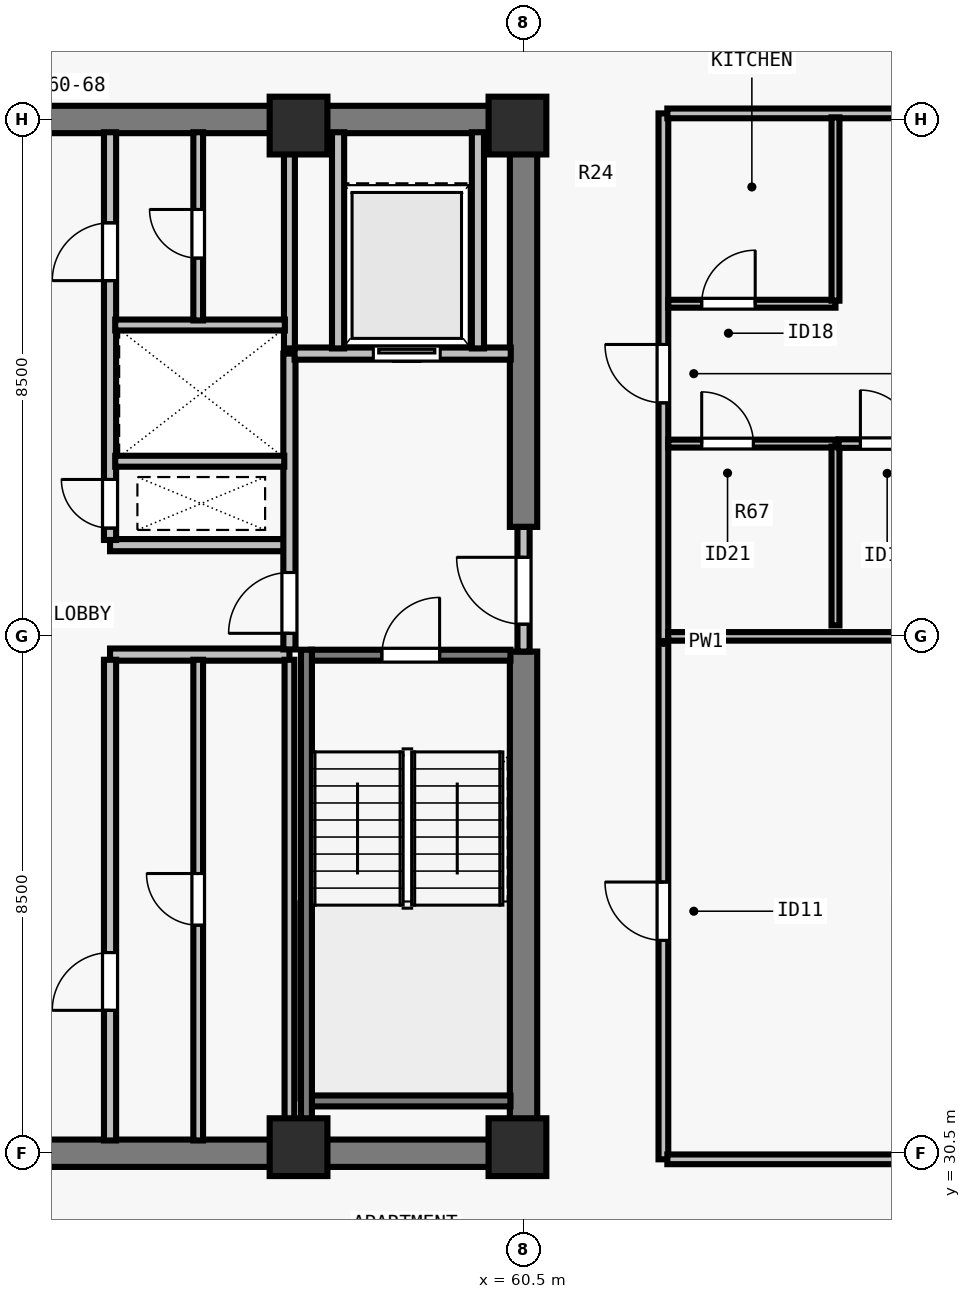
"""IFC4 building model, lengths in metres.
Left out: names, types, materials, properties, quantities, classifications, styles, units other than length and angle.
Written with IfcOpenShell. Run it as: python <this file> out.ifc"""

import sys

from ifc_helpers import new_model, si_unit, direction, frame, frame_2d, origin, origin_2d, place, context, subcontext, project, spatial, rectangle, extrude, element, fill, save


model = new_model("IFC4")
c1 = context("Model", 3, precision=1e-05, world=origin(), true_north=direction((0.0, 1.0)))
c2 = subcontext(c1, "Body", "Model", "MODEL_VIEW")
j1 = project(units=[si_unit("LENGTHUNIT", "METRE"), si_unit("PLANEANGLEUNIT", "RADIAN")], contexts=[c1])
p1 = place(None, origin())
s1 = spatial("IfcSite", under=j1, at=p1, CompositionType="ELEMENT")
p2 = place(p1, origin())
s2 = spatial("IfcBuilding", under=s1, at=p2, CompositionType="ELEMENT")
p3 = place(p2, frame((0.0, 0.0, 237.5)))
s3 = spatial("IfcBuildingStorey", under=s2, at=p3, CompositionType="ELEMENT", Elevation=237.5)
for number, where, z_axis, x_axis in (
    (1, (56.8, 30.6, 0.0), (0.0, 0.0, 1.0), (1.0, 0.0, 0.0)),
    (2, (60.4, 30.6, 0.0), (0.0, 0.0, 1.0), (1.0, 0.0, 0.0)),
    (3, (56.8, 47.4, 0.0), (0.0, 0.0, 1.0), (1.0, 0.0, 0.0)),
    (4, (60.4, 47.4, 0.0), (0.0, 0.0, 1.0), (1.0, 0.0, 0.0)),
):
    element("IfcColumn", number, at=place(p3, frame(where, z_axis=z_axis, x_axis=x_axis)), inside=s3, PredefinedType="COLUMN", context=c2, shape_type="SweptSolid", body=[
        extrude(rectangle(XDim=0.95, YDim=0.95, at=origin_2d()), origin(), (0.0, 0.0, 1.0), 3.5),
    ])
for number, where, z_axis, x_axis in (
    (5, (43.275, 30.5, 0.0), (0.0, 0.0, 1.0), (1.0, 0.0, 0.0)),
    (6, (43.275, 47.5, 0.0), (0.0, 0.0, 1.0), (1.0, 0.0, 0.0)),
):
    element("IfcWall", number, at=place(p3, frame(where, z_axis=z_axis, x_axis=x_axis)), inside=s3, PredefinedType="SHEAR", context=c2, shape_type="SweptSolid", body=[
        extrude(rectangle(XDim=17.45, YDim=0.45, at=frame_2d((8.725, 0.0))), origin(), (0.0, 0.0, 1.0), 3.29),
    ])
p4 = place(p3, frame((60.5, 30.715, 0.0), z_axis=(0.0, 0.0, 1.0), x_axis=(0.0, 1.0, 0.0)))
e7 = element("IfcWall", 7, at=p4, inside=s3, PredefinedType="SHEAR", context=c2, shape_type="SweptSolid", body=[
    extrude(rectangle(XDim=8.035, YDim=0.45, at=frame_2d((4.018, 0.0))), origin(), (0.0, 0.0, 1.0), 3.29),
])
p5 = place(p3, frame((60.5, 40.8, 0.0), z_axis=(0.0, 0.0, 1.0), x_axis=(0.0, 1.0, 0.0)))
e8 = element("IfcWall", 8, at=p5, inside=s3, PredefinedType="SHEAR", context=c2, shape_type="SweptSolid", body=[
    extrude(rectangle(XDim=6.485, YDim=0.45, at=frame_2d((3.242, 0.0))), origin(), (0.0, 0.0, 1.0), 3.29),
])
for number, where, z_axis, x_axis in (
    (9, (53.7, 38.7, 0.0), (0.0, 0.0, 1.0), (1.0, 0.0, 0.0)),
    (10, (53.7, 40.5, 0.0), (0.0, 0.0, 1.0), (1.0, 0.0, 0.0)),
):
    element("IfcWall", number, at=place(p3, frame(where, z_axis=z_axis, x_axis=x_axis)), inside=s3, PredefinedType="SOLIDWALL", context=c2, shape_type="SweptSolid", body=[
        extrude(rectangle(XDim=2.95, YDim=0.2, at=frame_2d((1.475, 0.0))), origin(), (0.0, 0.0, 1.0), 3.29),
    ])
p6 = place(p3, frame((53.7, 30.71, 0.0), z_axis=(0.0, 0.0, 1.0), x_axis=(0.0, 1.0, 0.0)))
e11 = element("IfcWall", 11, at=p6, inside=s3, PredefinedType="SOLIDWALL", context=c2, shape_type="SweptSolid", body=[
    extrude(rectangle(XDim=7.905, YDim=0.2, at=frame_2d((3.953, 0.0))), origin(), (0.0, 0.0, 1.0), 3.29),
])
p7 = place(p6, frame((2.14, 0.0, 0.0)))
e12 = element("IfcOpeningElement", 12, at=p7, cuts=e11, PredefinedType="OPENING", context=c2, shape_type="SweptSolid", body=[
    extrude(rectangle(XDim=0.95, YDim=2.12, at=frame_2d((0.475, 1.06))), frame((0.0, 0.11, 0.0), z_axis=(0.0, -1.0, 0.0), x_axis=(1.0, 0.0, 0.0)), (0.0, 0.0, 1.0), 0.22),
])
p8 = place(p3, frame((53.7, 40.585, 0.0), z_axis=(0.0, 0.0, 1.0), x_axis=(0.0, 1.0, 0.0)))
e13 = element("IfcWall", 13, at=p8, inside=s3, PredefinedType="SOLIDWALL", context=c2, shape_type="SweptSolid", body=[
    extrude(rectangle(XDim=6.705, YDim=0.2, at=frame_2d((3.353, 0.0))), origin(), (0.0, 0.0, 1.0), 3.29),
])
p9 = place(p8, frame((0.195, 0.0, 0.0)))
e14 = element("IfcOpeningElement", 14, at=p9, cuts=e13, PredefinedType="OPENING", context=c2, shape_type="SweptSolid", body=[
    extrude(rectangle(XDim=0.8, YDim=2.08, at=frame_2d((0.4, 1.04))), frame((0.0, 0.11, 0.0), z_axis=(0.0, -1.0, 0.0), x_axis=(1.0, 0.0, 0.0)), (0.0, 0.0, 1.0), 0.22),
])
p10 = place(p8, frame((4.265, 0.0, 0.0)))
e15 = element("IfcOpeningElement", 15, at=p10, cuts=e13, PredefinedType="OPENING", context=c2, shape_type="SweptSolid", body=[
    extrude(rectangle(XDim=0.95, YDim=2.12, at=frame_2d((0.475, 1.06))), frame((0.0, 0.11, 0.0), z_axis=(0.0, -1.0, 0.0), x_axis=(1.0, 0.0, 0.0)), (0.0, 0.0, 1.0), 0.22),
])
p11 = place(p3, frame((60.5, 38.75, 0.0), z_axis=(0.0, 0.0, 1.0), x_axis=(0.0, 1.0, 0.0)))
e16 = element("IfcWall", 16, at=p11, inside=s3, PredefinedType="SOLIDWALL", context=c2, shape_type="SweptSolid", body=[
    extrude(rectangle(XDim=2.05, YDim=0.2, at=frame_2d((1.025, 0.0))), origin(), (0.0, 0.0, 1.0), 3.29),
])
p12 = place(p11, frame((0.45, 0.0, 0.0)))
e17 = element("IfcOpeningElement", 17, at=p12, cuts=e16, PredefinedType="OPENING", context=c2, shape_type="SweptSolid", body=[
    extrude(rectangle(XDim=1.1, YDim=2.15, at=frame_2d((0.55, 1.075))), frame((0.0, 0.11, 0.0), z_axis=(0.0, -1.0, 0.0), x_axis=(1.0, 0.0, 0.0)), (0.0, 0.0, 1.0), 0.22),
])
p13 = place(p3, frame((56.65, 38.785, 0.0), z_axis=(0.0, 0.0, 1.0), x_axis=(0.0, 1.0, 0.0)))
e18 = element("IfcWall", 18, at=p13, inside=s3, PredefinedType="SOLIDWALL", context=c2, shape_type="SweptSolid", body=[
    extrude(rectangle(XDim=4.865, YDim=0.2, at=frame_2d((2.433, 0.0))), origin(), (0.0, 0.0, 1.0), 3.29),
])
p14 = place(p13, frame((0.265, 0.0, 0.0)))
e19 = element("IfcOpeningElement", 19, at=p14, cuts=e18, PredefinedType="OPENING", context=c2, shape_type="SweptSolid", body=[
    extrude(rectangle(XDim=1.0, YDim=2.15, at=frame_2d((0.5, 1.075))), frame((0.0, 0.11, 0.0), z_axis=(0.0, -1.0, 0.0), x_axis=(1.0, 0.0, 0.0)), (0.0, 0.0, 1.0), 0.22),
])
p15 = place(p3, frame((56.735, 43.65, 0.0), z_axis=(0.0, 0.0, 1.0), x_axis=(1.0, 0.0, 0.0)))
e20 = element("IfcWall", 20, at=p15, inside=s3, PredefinedType="SOLIDWALL", context=c2, shape_type="SweptSolid", body=[
    extrude(rectangle(XDim=3.555, YDim=0.2, at=frame_2d((1.777, 0.0))), origin(), (0.0, 0.0, 1.0), 3.29),
])
p16 = place(p15, frame((1.295, 0.0, 0.0)))
e21 = element("IfcOpeningElement", 21, at=p16, cuts=e20, PredefinedType="OPENING", context=c2, shape_type="SweptSolid", body=[
    extrude(rectangle(XDim=1.1, YDim=2.2, at=frame_2d((0.55, 1.1))), frame((0.0, 0.11, 0.0), z_axis=(0.0, -1.0, 0.0), x_axis=(1.0, 0.0, 0.0)), (0.0, 0.0, 1.0), 0.22),
])
for number, where, z_axis, x_axis in (
    (22, (57.45, 43.735, 0.0), (0.0, 0.0, 1.0), (0.0, 1.0, 0.0)),
    (23, (59.75, 43.735, 0.0), (0.0, 0.0, 1.0), (0.0, 1.0, 0.0)),
):
    element("IfcWall", number, at=place(p3, frame(where, z_axis=z_axis, x_axis=x_axis)), inside=s3, PredefinedType="SOLIDWALL", context=c2, shape_type="SweptSolid", body=[
        extrude(rectangle(XDim=3.555, YDim=0.2, at=frame_2d((1.777, 0.0))), origin(), (0.0, 0.0, 1.0), 3.29),
    ])
p17 = place(p3, frame((56.65, 30.71, 0.0), z_axis=(0.0, 0.0, 1.0), x_axis=(0.0, 1.0, 0.0)))
e24 = element("IfcWall", 24, at=p17, inside=s3, PredefinedType="PARTITIONING", context=c2, shape_type="SweptSolid", body=[
    extrude(rectangle(XDim=7.905, YDim=0.16, at=frame_2d((3.953, 0.0))), origin(), (0.0, 0.0, 1.0), 3.29),
])
p18 = place(p3, frame((55.15, 30.71, 0.0), z_axis=(0.0, 0.0, 1.0), x_axis=(0.0, 1.0, 0.0)))
e25 = element("IfcWall", 25, at=p18, inside=s3, PredefinedType="PARTITIONING", context=c2, shape_type="SweptSolid", body=[
    extrude(rectangle(XDim=7.905, YDim=0.16, at=frame_2d((3.953, 0.0))), origin(), (0.0, 0.0, 1.0), 3.29),
])
p19 = place(p18, frame((3.54, 0.0, 0.0)))
e26 = element("IfcOpeningElement", 26, at=p19, cuts=e25, PredefinedType="OPENING", context=c2, shape_type="SweptSolid", body=[
    extrude(rectangle(XDim=0.85, YDim=2.12, at=frame_2d((0.425, 1.06))), frame((0.0, 0.09, 0.0), z_axis=(0.0, -1.0, 0.0), x_axis=(1.0, 0.0, 0.0)), (0.0, 0.0, 1.0), 0.18),
])
p20 = place(p3, frame((56.65, 43.735, 0.0), z_axis=(0.0, 0.0, 1.0), x_axis=(0.0, 1.0, 0.0)))
e27 = element("IfcWall", 27, at=p20, inside=s3, PredefinedType="SOLIDWALL", context=c2, shape_type="SweptSolid", body=[
    extrude(rectangle(XDim=3.555, YDim=0.18, at=frame_2d((1.777, 0.0))), origin(), (0.0, 0.0, 1.0), 3.29),
])
p21 = place(p3, frame((53.785, 41.88, 0.0), z_axis=(0.0, 0.0, 1.0), x_axis=(1.0, 0.0, 0.0)))
e28 = element("IfcWall", 28, at=p21, inside=s3, PredefinedType="SOLIDWALL", context=c2, shape_type="SweptSolid", body=[
    extrude(rectangle(XDim=2.78, YDim=0.18, at=frame_2d((1.39, 0.0))), origin(), (0.0, 0.0, 1.0), 3.29),
])
p22 = place(p3, frame((53.785, 44.12, 0.0), z_axis=(0.0, 0.0, 1.0), x_axis=(1.0, 0.0, 0.0)))
e29 = element("IfcWall", 29, at=p22, inside=s3, PredefinedType="SOLIDWALL", context=c2, shape_type="SweptSolid", body=[
    extrude(rectangle(XDim=2.79, YDim=0.18, at=frame_2d((1.395, 0.0))), origin(), (0.0, 0.0, 1.0), 3.29),
])
p23 = place(p3, frame((55.15, 44.195, 0.0), z_axis=(0.0, 0.0, 1.0), x_axis=(0.0, 1.0, 0.0)))
e30 = element("IfcWall", 30, at=p23, inside=s3, PredefinedType="PARTITIONING", context=c2, shape_type="SweptSolid", body=[
    extrude(rectangle(XDim=3.095, YDim=0.16, at=frame_2d((1.547, 0.0))), origin(), (0.0, 0.0, 1.0), 3.29),
])
p24 = place(p23, frame((1.025, 0.0, 0.0)))
e31 = element("IfcOpeningElement", 31, at=p24, cuts=e30, PredefinedType="OPENING", context=c2, shape_type="SweptSolid", body=[
    extrude(rectangle(XDim=0.8, YDim=2.1, at=frame_2d((0.4, 1.05))), frame((0.0, 0.09, 0.0), z_axis=(0.0, -1.0, 0.0), x_axis=(1.0, 0.0, 0.0)), (0.0, 0.0, 1.0), 0.18),
])
p25 = place(p3, frame((62.8, 30.4, 0.0), z_axis=(0.0, 0.0, 1.0), x_axis=(0.0, 1.0, 0.0)))
e32 = element("IfcWall", 32, at=p25, inside=s3, PredefinedType="PARTITIONING", context=c2, shape_type="SweptSolid", body=[
    extrude(rectangle(XDim=17.2, YDim=0.16, at=frame_2d((8.6, 0.0))), origin(), (0.0, 0.0, 1.0), 3.29),
])
p26 = place(p25, frame((3.6, 0.0, 0.0)))
e33 = element("IfcOpeningElement", 33, at=p26, cuts=e32, PredefinedType="OPENING", context=c2, shape_type="SweptSolid", body=[
    extrude(rectangle(XDim=0.96, YDim=2.12, at=frame_2d((0.48, 1.06))), frame((0.0, 0.09, 0.0), z_axis=(0.0, -1.0, 0.0), x_axis=(1.0, 0.0, 0.0)), (0.0, 0.0, 1.0), 0.18),
])
p27 = place(p25, frame((12.44, 0.0, 0.0)))
e34 = element("IfcOpeningElement", 34, at=p27, cuts=e32, PredefinedType="OPENING", context=c2, shape_type="SweptSolid", body=[
    extrude(rectangle(XDim=0.96, YDim=2.18, at=frame_2d((0.48, 1.09))), frame((0.0, 0.09, 0.0), z_axis=(0.0, -1.0, 0.0), x_axis=(1.0, 0.0, 0.0)), (0.0, 0.0, 1.0), 0.18),
])
for number, where, z_axis, x_axis in (
    (35, (62.865, 30.4, 0.0), (0.0, 0.0, 1.0), (1.0, 0.0, 0.0)),
    (36, (62.865, 47.6, 0.0), (0.0, 0.0, 1.0), (1.0, 0.0, 0.0)),
):
    element("IfcWall", number, at=place(p3, frame(where, z_axis=z_axis, x_axis=x_axis)), inside=s3, PredefinedType="PARTITIONING", context=c2, shape_type="SweptSolid", body=[
        extrude(rectangle(XDim=11.33, YDim=0.16, at=frame_2d((5.665, 0.0))), origin(), (0.0, 0.0, 1.0), 3.29),
    ])
p28 = place(p3, frame((62.88, 39.0, 0.0), z_axis=(0.0, 0.0, 1.0), x_axis=(1.0, 0.0, 0.0)))
e37 = element("IfcWall", 37, at=p28, inside=s3, PredefinedType="PARTITIONING", context=c2, shape_type="SweptSolid", body=[
    extrude(rectangle(XDim=11.315, YDim=0.14, at=frame_2d((5.658, 0.0))), origin(), (0.0, 0.0, 1.0), 3.29),
])
p29 = place(p3, frame((62.88, 42.17, 0.0), z_axis=(0.0, 0.0, 1.0), x_axis=(1.0, 0.0, 0.0)))
e38 = element("IfcWall", 38, at=p29, inside=s3, PredefinedType="PLUMBINGWALL", context=c2, shape_type="SweptSolid", body=[
    extrude(rectangle(XDim=2.75, YDim=0.13, at=frame_2d((1.375, 0.0))), origin(), (0.0, 0.0, 1.0), 3.29),
])
p30 = place(p29, frame((0.55, 0.0, 0.0)))
e39 = element("IfcOpeningElement", 39, at=p30, cuts=e38, PredefinedType="OPENING", context=c2, shape_type="SweptSolid", body=[
    extrude(rectangle(XDim=0.85, YDim=2.08, at=frame_2d((0.425, 1.04))), frame((0.0, 0.075, 0.0), z_axis=(0.0, -1.0, 0.0), x_axis=(1.0, 0.0, 0.0)), (0.0, 0.0, 1.0), 0.15),
])
p31 = place(p3, frame((65.63, 39.18, 0.0), z_axis=(0.0, 0.0, 1.0), x_axis=(0.0, 1.0, 0.0)))
e40 = element("IfcWall", 40, at=p31, inside=s3, PredefinedType="PLUMBINGWALL", context=c2, shape_type="SweptSolid", body=[
    extrude(rectangle(XDim=2.94, YDim=0.13, at=frame_2d((1.47, 0.0))), origin(), (0.0, 0.0, 1.0), 3.29),
])
p32 = place(p3, frame((62.88, 44.47, 0.0), z_axis=(0.0, 0.0, 1.0), x_axis=(1.0, 0.0, 0.0)))
e41 = element("IfcWall", 41, at=p32, inside=s3, PredefinedType="PLUMBINGWALL", context=c2, shape_type="SweptSolid", body=[
    extrude(rectangle(XDim=2.75, YDim=0.13, at=frame_2d((1.375, 0.0))), origin(), (0.0, 0.0, 1.0), 3.29),
])
p33 = place(p32, frame((0.55, 0.0, 0.0)))
e42 = element("IfcOpeningElement", 42, at=p33, cuts=e41, PredefinedType="OPENING", context=c2, shape_type="SweptSolid", body=[
    extrude(rectangle(XDim=0.88, YDim=2.1, at=frame_2d((0.44, 1.05))), frame((0.0, 0.075, 0.0), z_axis=(0.0, -1.0, 0.0), x_axis=(1.0, 0.0, 0.0)), (0.0, 0.0, 1.0), 0.15),
])
p34 = place(p3, frame((65.63, 44.52, 0.0), z_axis=(0.0, 0.0, 1.0), x_axis=(0.0, 1.0, 0.0)))
e43 = element("IfcWall", 43, at=p34, inside=s3, PredefinedType="PLUMBINGWALL", context=c2, shape_type="SweptSolid", body=[
    extrude(rectangle(XDim=3.015, YDim=0.13, at=frame_2d((1.507, 0.0))), origin(), (0.0, 0.0, 1.0), 3.29),
])
p35 = place(p3, frame((65.68, 42.17, 0.0), z_axis=(0.0, 0.0, 1.0), x_axis=(1.0, 0.0, 0.0)))
e44 = element("IfcWall", 44, at=p35, inside=s3, PredefinedType="PARTITIONING", context=c2, shape_type="SweptSolid", body=[
    extrude(rectangle(XDim=8.44, YDim=0.14, at=frame_2d((4.22, 0.0))), origin(), (0.0, 0.0, 1.0), 3.29),
])
p36 = place(p35, frame((0.36, 0.0, 0.0)))
e45 = element("IfcOpeningElement", 45, at=p36, cuts=e44, PredefinedType="OPENING", context=c2, shape_type="SweptSolid", body=[
    extrude(rectangle(XDim=0.88, YDim=2.1, at=frame_2d((0.44, 1.05))), frame((0.0, 0.08, 0.0), z_axis=(0.0, -1.0, 0.0), x_axis=(1.0, 0.0, 0.0)), (0.0, 0.0, 1.0), 0.16),
])
p37 = place(p3, frame((57.005, 38.69, 0.0), z_axis=(0.0, 0.0, 1.0), x_axis=(1.0, 0.0, 0.0)))
e46 = element("IfcWall", 46, at=p37, inside=s3, PredefinedType="SOLIDWALL", context=c2, shape_type="SweptSolid", body=[
    extrude(rectangle(XDim=3.28, YDim=0.18, at=frame_2d((1.64, 0.0))), origin(), (0.0, 0.0, 1.0), 3.29),
])
p38 = place(p37, frame((1.165, 0.0, 0.0)))
e47 = element("IfcOpeningElement", 47, at=p38, cuts=e46, PredefinedType="OPENING", context=c2, shape_type="SweptSolid", body=[
    extrude(rectangle(XDim=0.95, YDim=2.15, at=frame_2d((0.475, 1.075))), frame((0.0, 0.1, 0.0), z_axis=(0.0, -1.0, 0.0), x_axis=(1.0, 0.0, 0.0)), (0.0, 0.0, 1.0), 0.2),
])
p39 = place(p3, frame((57.005, 31.36, 0.0), z_axis=(0.0, 0.0, 1.0), x_axis=(1.0, 0.0, 0.0)))
e48 = element("IfcWall", 48, at=p39, inside=s3, PredefinedType="SOLIDWALL", context=c2, shape_type="SweptSolid", body=[
    extrude(rectangle(XDim=3.28, YDim=0.18, at=frame_2d((1.64, 0.0))), origin(), (0.0, 0.0, 1.0), 3.29),
])
p40 = place(p3, frame((56.93, 38.78, 0.0), z_axis=(0.0, 0.0, 1.0), x_axis=(0.0, -1.0, 0.0)))
e49 = element("IfcWall", 49, at=p40, inside=s3, PredefinedType="SOLIDWALL", context=c2, shape_type="SweptSolid", body=[
    extrude(rectangle(XDim=8.067, YDim=0.18, at=frame_2d((4.034, 0.0))), origin(), (0.0, 0.0, 1.0), 3.29),
])
p41 = place(p12, origin())
e50 = element("IfcDoor", 50, at=p41, inside=s3, OperationType="SINGLE_SWING_RIGHT", PredefinedType="DOOR", context=c2, shape_type="SweptSolid", body=[
    extrude(rectangle(XDim=1.1, YDim=2.15, at=frame_2d((0.55, 1.075))), frame((0.0, 0.025, 0.0), z_axis=(0.0, -1.0, 0.0), x_axis=(1.0, 0.0, 0.0)), (0.0, 0.0, 1.0), 0.05),
])
fill(e17, e50)
p42 = place(p14, origin())
e51 = element("IfcDoor", 51, at=p42, inside=s3, OperationType="SINGLE_SWING_LEFT", PredefinedType="DOOR", context=c2, shape_type="SweptSolid", body=[
    extrude(rectangle(XDim=1.0, YDim=2.15, at=frame_2d((0.5, 1.075))), frame((0.0, 0.025, 0.0), z_axis=(0.0, -1.0, 0.0), x_axis=(1.0, 0.0, 0.0)), (0.0, 0.0, 1.0), 0.05),
])
fill(e19, e51)
p43 = place(p16, origin())
e52 = element("IfcDoor", 52, at=p43, inside=s3, OperationType="SLIDING_TO_LEFT", PredefinedType="DOOR", context=c2, shape_type="SweptSolid", body=[
    extrude(rectangle(XDim=1.1, YDim=2.2, at=frame_2d((0.55, 1.1))), frame((0.0, 0.025, 0.0), z_axis=(0.0, -1.0, 0.0), x_axis=(1.0, 0.0, 0.0)), (0.0, 0.0, 1.0), 0.05),
])
fill(e21, e52)
p44 = place(p7, origin())
e53 = element("IfcDoor", 53, at=p44, inside=s3, OperationType="SINGLE_SWING_LEFT", PredefinedType="DOOR", context=c2, shape_type="SweptSolid", body=[
    extrude(rectangle(XDim=0.95, YDim=2.12, at=frame_2d((0.475, 1.06))), frame((0.0, 0.025, 0.0), z_axis=(0.0, -1.0, 0.0), x_axis=(1.0, 0.0, 0.0)), (0.0, 0.0, 1.0), 0.05),
])
fill(e12, e53)
p45 = place(p19, origin())
e54 = element("IfcDoor", 54, at=p45, inside=s3, OperationType="SINGLE_SWING_RIGHT", PredefinedType="DOOR", context=c2, shape_type="SweptSolid", body=[
    extrude(rectangle(XDim=0.85, YDim=2.12, at=frame_2d((0.425, 1.06))), frame((0.0, 0.025, 0.0), z_axis=(0.0, -1.0, 0.0), x_axis=(1.0, 0.0, 0.0)), (0.0, 0.0, 1.0), 0.05),
])
fill(e26, e54)
p46 = place(p9, origin())
e55 = element("IfcDoor", 55, at=p46, inside=s3, OperationType="SINGLE_SWING_RIGHT", PredefinedType="DOOR", context=c2, shape_type="SweptSolid", body=[
    extrude(rectangle(XDim=0.8, YDim=2.08, at=frame_2d((0.4, 1.04))), frame((0.0, 0.025, 0.0), z_axis=(0.0, -1.0, 0.0), x_axis=(1.0, 0.0, 0.0)), (0.0, 0.0, 1.0), 0.05),
])
fill(e14, e55)
p47 = place(p10, origin())
e56 = element("IfcDoor", 56, at=p47, inside=s3, OperationType="SINGLE_SWING_LEFT", PredefinedType="DOOR", context=c2, shape_type="SweptSolid", body=[
    extrude(rectangle(XDim=0.95, YDim=2.12, at=frame_2d((0.475, 1.06))), frame((0.0, 0.025, 0.0), z_axis=(0.0, -1.0, 0.0), x_axis=(1.0, 0.0, 0.0)), (0.0, 0.0, 1.0), 0.05),
])
fill(e15, e56)
p48 = place(p24, origin())
e57 = element("IfcDoor", 57, at=p48, inside=s3, OperationType="SINGLE_SWING_RIGHT", PredefinedType="DOOR", context=c2, shape_type="SweptSolid", body=[
    extrude(rectangle(XDim=0.8, YDim=2.1, at=frame_2d((0.4, 1.05))), frame((0.0, 0.025, 0.0), z_axis=(0.0, -1.0, 0.0), x_axis=(1.0, 0.0, 0.0)), (0.0, 0.0, 1.0), 0.05),
])
fill(e31, e57)
p49 = place(p26, origin())
e58 = element("IfcDoor", 58, at=p49, inside=s3, OperationType="SINGLE_SWING_RIGHT", PredefinedType="DOOR", context=c2, shape_type="SweptSolid", body=[
    extrude(rectangle(XDim=0.96, YDim=2.12, at=frame_2d((0.48, 1.06))), frame((0.0, 0.025, 0.0), z_axis=(0.0, -1.0, 0.0), x_axis=(1.0, 0.0, 0.0)), (0.0, 0.0, 1.0), 0.05),
])
fill(e33, e58)
p50 = place(p30, origin())
e59 = element("IfcDoor", 59, at=p50, inside=s3, OperationType="SINGLE_SWING_LEFT", PredefinedType="DOOR", context=c2, shape_type="SweptSolid", body=[
    extrude(rectangle(XDim=0.85, YDim=2.08, at=frame_2d((0.425, 1.04))), frame((0.0, 0.025, 0.0), z_axis=(0.0, -1.0, 0.0), x_axis=(1.0, 0.0, 0.0)), (0.0, 0.0, 1.0), 0.05),
])
fill(e39, e59)
p51 = place(p33, origin())
e60 = element("IfcDoor", 60, at=p51, inside=s3, OperationType="SINGLE_SWING_RIGHT", PredefinedType="DOOR", context=c2, shape_type="SweptSolid", body=[
    extrude(rectangle(XDim=0.88, YDim=2.1, at=frame_2d((0.44, 1.05))), frame((0.0, 0.025, 0.0), z_axis=(0.0, -1.0, 0.0), x_axis=(1.0, 0.0, 0.0)), (0.0, 0.0, 1.0), 0.05),
])
fill(e42, e60)
p52 = place(p36, origin())
e61 = element("IfcDoor", 61, at=p52, inside=s3, OperationType="SINGLE_SWING_LEFT", PredefinedType="DOOR", context=c2, shape_type="SweptSolid", body=[
    extrude(rectangle(XDim=0.88, YDim=2.1, at=frame_2d((0.44, 1.05))), frame((0.0, 0.025, 0.0), z_axis=(0.0, -1.0, 0.0), x_axis=(1.0, 0.0, 0.0)), (0.0, 0.0, 1.0), 0.05),
])
fill(e45, e61)
p53 = place(p27, origin())
e62 = element("IfcDoor", 62, at=p53, inside=s3, OperationType="SINGLE_SWING_RIGHT", PredefinedType="DOOR", context=c2, shape_type="SweptSolid", body=[
    extrude(rectangle(XDim=0.96, YDim=2.18, at=frame_2d((0.48, 1.09))), frame((0.0, 0.025, 0.0), z_axis=(0.0, -1.0, 0.0), x_axis=(1.0, 0.0, 0.0)), (0.0, 0.0, 1.0), 0.05),
])
fill(e34, e62)
p54 = place(p38, origin())
e63 = element("IfcDoor", 63, at=p54, inside=s3, OperationType="SINGLE_SWING_RIGHT", PredefinedType="DOOR", context=c2, shape_type="SweptSolid", body=[
    extrude(rectangle(XDim=0.95, YDim=2.15, at=frame_2d((0.475, 1.075))), frame((0.0, 0.025, 0.0), z_axis=(0.0, -1.0, 0.0), x_axis=(1.0, 0.0, 0.0)), (0.0, 0.0, 1.0), 0.05),
])
fill(e47, e63)
save(model, sys.argv[1])
